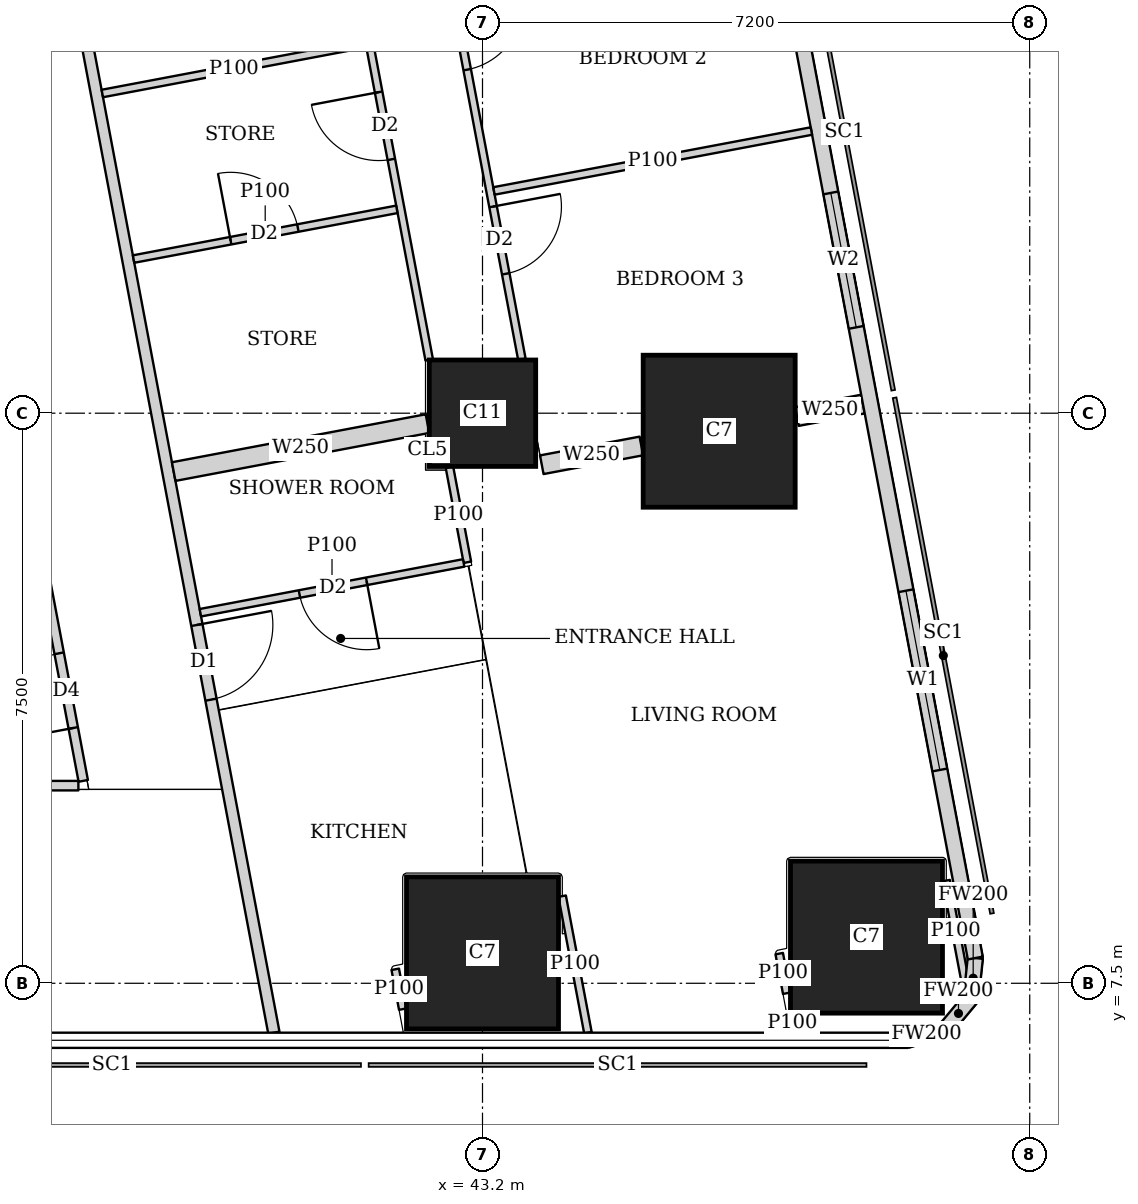
"""IFC4 building model, lengths in metres.
Left out: names, types, materials, properties, quantities, classifications, styles, units other than length and angle.
Written with IfcOpenShell. Run it as: python <this file> out.ifc"""

import sys

from ifc_helpers import new_model, si_unit, direction, frame, frame_2d, origin, origin_2d, place, context, subcontext, project, spatial, rectangle, extrude, element, fill, save


model = new_model("IFC4")
c1 = context("Model", 3, precision=1e-05, world=origin(), true_north=direction((0.0, 1.0)))
c2 = subcontext(c1, "Body", "Model", "MODEL_VIEW")
j1 = project(units=[si_unit("LENGTHUNIT", "METRE"), si_unit("PLANEANGLEUNIT", "RADIAN")], contexts=[c1])
p1 = place(None, origin())
s1 = spatial("IfcSite", under=j1, at=p1, CompositionType="ELEMENT")
p2 = place(p1, origin())
s2 = spatial("IfcBuilding", under=s1, at=p2, CompositionType="ELEMENT")
p3 = place(p2, frame((0.0, 0.0, 281.6)))
s3 = spatial("IfcBuildingStorey", under=s2, at=p3, CompositionType="ELEMENT", Elevation=281.6)
for number, where, z_axis, x_axis in (
    (1, (43.2, 7.9, 0.0), (0.0, 0.0, 1.0), (1.0, 0.0, 0.0)),
    (2, (48.252, 8.107, 0.0), (0.0, 0.0, 1.0), (1.0, 0.0, 0.0)),
):
    element("IfcColumn", number, at=place(p3, frame(where, z_axis=z_axis, x_axis=x_axis)), inside=s3, PredefinedType="COLUMN", context=c2, shape_type="SweptSolid", body=[
        extrude(rectangle(XDim=2.0, YDim=2.0, at=origin_2d()), origin(), (0.0, 0.0, 1.0), 3.75),
    ])
p4 = place(p3, frame((43.2, 15.0, 0.0), z_axis=(0.0, 0.0, 1.0), x_axis=(1.0, 0.0, 0.0)))
e3 = element("IfcColumn", 3, at=p4, inside=s3, PredefinedType="COLUMN", context=c2, shape_type="SweptSolid", body=[
    extrude(rectangle(XDim=1.4, YDim=1.4, at=origin_2d()), origin(), (0.0, 0.0, 1.0), 3.75),
])
p5 = place(p3, frame((46.314, 14.763, 0.0), z_axis=(0.0, 0.0, 1.0), x_axis=(1.0, 0.0, 0.0)))
e4 = element("IfcColumn", 4, at=p5, inside=s3, PredefinedType="COLUMN", context=c2, shape_type="SweptSolid", body=[
    extrude(rectangle(XDim=2.0, YDim=2.0, at=origin_2d()), origin(), (0.0, 0.0, 1.0), 3.75),
])
p6 = place(p3, frame((48.787, 6.75, 0.0), z_axis=(0.0, 0.0, 1.0), x_axis=(0.957282247819, 0.289155145225, 0.0)))
e5 = element("IfcWall", 5, at=p6, inside=s3, PredefinedType="SOLIDWALL", context=c2, shape_type="SweptSolid", body=[
    extrude(rectangle(XDim=0.533, YDim=0.2, at=frame_2d((0.266, 0.0))), origin(), (0.0, 0.0, 1.0), 3.5),
])
p7 = place(p3, frame((49.297, 6.904, 0.0), z_axis=(0.0, 0.0, 1.0), x_axis=(0.639255849474, 0.768994121508, 0.0)))
e6 = element("IfcWall", 6, at=p7, inside=s3, PredefinedType="SOLIDWALL", context=c2, shape_type="SweptSolid", body=[
    extrude(rectangle(XDim=0.518, YDim=0.2, at=frame_2d((0.259, 0.0))), origin(), (0.0, 0.0, 1.0), 3.5),
])
p8 = place(p3, frame((49.628, 7.302, 0.0), z_axis=(0.0, 0.0, 1.0), x_axis=(0.105352390132, 0.994434952068, 0.0)))
e7 = element("IfcWall", 7, at=p8, inside=s3, PredefinedType="SOLIDWALL", context=c2, shape_type="SweptSolid", body=[
    extrude(rectangle(XDim=0.533, YDim=0.2, at=frame_2d((0.267, 0.0))), origin(), (0.0, 0.0, 1.0), 3.5),
])
p9 = place(p3, frame((49.684, 7.832, 0.0), z_axis=(0.0, 0.0, 1.0), x_axis=(-0.185616669694, 0.982622232565, 0.0)))
e8 = element("IfcWall", 8, at=p9, inside=s3, PredefinedType="SOLIDWALL", context=c2, shape_type="SweptSolid", body=[
    extrude(rectangle(XDim=36.0, YDim=0.2, at=frame_2d((18.0, 0.0))), origin(), (0.0, 0.0, 1.0), 3.5),
])
p10 = place(p9, frame((2.518, 0.0, 0.9)))
e9 = element("IfcOpeningElement", 9, at=p10, cuts=e8, PredefinedType="OPENING", context=c2, shape_type="SweptSolid", body=[
    extrude(rectangle(XDim=2.4, YDim=1.5, at=frame_2d((1.2, 0.75))), frame((0.0, 0.11, 0.0), z_axis=(0.0, -1.0, 0.0), x_axis=(1.0, 0.0, 0.0)), (0.0, 0.0, 1.0), 0.22),
])
p11 = place(p9, frame((8.444, 0.0, 0.9)))
e10 = element("IfcOpeningElement", 10, at=p11, cuts=e8, PredefinedType="OPENING", context=c2, shape_type="SweptSolid", body=[
    extrude(rectangle(XDim=1.8, YDim=1.5, at=frame_2d((0.9, 0.75))), frame((0.0, 0.11, 0.0), z_axis=(0.0, -1.0, 0.0), x_axis=(1.0, 0.0, 0.0)), (0.0, 0.0, 1.0), 0.22),
])
p12 = place(p9, frame((12.261, 0.0, 0.9)))
e11 = element("IfcOpeningElement", 11, at=p12, cuts=e8, PredefinedType="OPENING", context=c2, shape_type="SweptSolid", body=[
    extrude(rectangle(XDim=1.8, YDim=1.5, at=frame_2d((0.9, 0.75))), frame((0.0, 0.11, 0.0), z_axis=(0.0, -1.0, 0.0), x_axis=(1.0, 0.0, 0.0)), (0.0, 0.0, 1.0), 0.22),
])
p13 = place(p9, frame((16.078, 0.0, 0.9)))
e12 = element("IfcOpeningElement", 12, at=p13, cuts=e8, PredefinedType="OPENING", context=c2, shape_type="SweptSolid", body=[
    extrude(rectangle(XDim=1.8, YDim=1.5, at=frame_2d((0.9, 0.75))), frame((0.0, 0.11, 0.0), z_axis=(0.0, -1.0, 0.0), x_axis=(1.0, 0.0, 0.0)), (0.0, 0.0, 1.0), 0.22),
])
p14 = place(p9, frame((19.894, 0.0, 0.9)))
e13 = element("IfcOpeningElement", 13, at=p14, cuts=e8, PredefinedType="OPENING", context=c2, shape_type="SweptSolid", body=[
    extrude(rectangle(XDim=1.8, YDim=1.5, at=frame_2d((0.9, 0.75))), frame((0.0, 0.11, 0.0), z_axis=(0.0, -1.0, 0.0), x_axis=(1.0, 0.0, 0.0)), (0.0, 0.0, 1.0), 0.22),
])
p15 = place(p9, frame((23.71, 0.0, 0.9)))
e14 = element("IfcOpeningElement", 14, at=p15, cuts=e8, PredefinedType="OPENING", context=c2, shape_type="SweptSolid", body=[
    extrude(rectangle(XDim=1.8, YDim=1.5, at=frame_2d((0.9, 0.75))), frame((0.0, 0.11, 0.0), z_axis=(0.0, -1.0, 0.0), x_axis=(1.0, 0.0, 0.0)), (0.0, 0.0, 1.0), 0.22),
])
p16 = place(p9, frame((27.526, 0.0, 0.9)))
e15 = element("IfcOpeningElement", 15, at=p16, cuts=e8, PredefinedType="OPENING", context=c2, shape_type="SweptSolid", body=[
    extrude(rectangle(XDim=1.8, YDim=1.5, at=frame_2d((0.9, 0.75))), frame((0.0, 0.11, 0.0), z_axis=(0.0, -1.0, 0.0), x_axis=(1.0, 0.0, 0.0)), (0.0, 0.0, 1.0), 0.22),
])
p17 = place(p9, frame((32.046, 0.0, 0.9)))
e16 = element("IfcOpeningElement", 16, at=p17, cuts=e8, PredefinedType="OPENING", context=c2, shape_type="SweptSolid", body=[
    extrude(rectangle(XDim=1.8, YDim=1.5, at=frame_2d((0.9, 0.75))), frame((0.0, 0.11, 0.0), z_axis=(0.0, -1.0, 0.0), x_axis=(1.0, 0.0, 0.0)), (0.0, 0.0, 1.0), 0.22),
])
p18 = place(p3, frame((33.781, 42.186, 0.0), z_axis=(0.0, 0.0, 1.0), x_axis=(0.185593518645, -0.9826266055, 0.0)))
e17 = element("IfcWall", 17, at=p18, inside=s3, PredefinedType="SOLIDWALL", context=c2, shape_type="SweptSolid", body=[
    extrude(rectangle(XDim=35.961, YDim=0.15, at=frame_2d((17.98, 0.0))), origin(), (0.0, 0.0, 1.0), 2.5),
])
p19 = place(p18, frame((11.76, 0.0, 0.0)))
e18 = element("IfcOpeningElement", 18, at=p19, cuts=e17, PredefinedType="OPENING", context=c2, shape_type="SweptSolid", body=[
    extrude(rectangle(XDim=1.0, YDim=2.1, at=frame_2d((0.5, 1.05))), frame((0.0, 0.085, 0.0), z_axis=(0.0, -1.0, 0.0), x_axis=(1.0, 0.0, 0.0)), (0.0, 0.0, 1.0), 0.17),
])
p20 = place(p18, frame((15.576, 0.0, 0.0)))
e19 = element("IfcOpeningElement", 19, at=p20, cuts=e17, PredefinedType="OPENING", context=c2, shape_type="SweptSolid", body=[
    extrude(rectangle(XDim=1.0, YDim=2.1, at=frame_2d((0.5, 1.05))), frame((0.0, 0.085, 0.0), z_axis=(0.0, -1.0, 0.0), x_axis=(1.0, 0.0, 0.0)), (0.0, 0.0, 1.0), 0.17),
])
p21 = place(p18, frame((30.502, 0.0, 0.0)))
e20 = element("IfcOpeningElement", 20, at=p21, cuts=e17, PredefinedType="OPENING", context=c2, shape_type="SweptSolid", body=[
    extrude(rectangle(XDim=1.0, YDim=2.1, at=frame_2d((0.5, 1.05))), frame((0.0, 0.085, 0.0), z_axis=(0.0, -1.0, 0.0), x_axis=(1.0, 0.0, 0.0)), (0.0, 0.0, 1.0), 0.17),
])
p22 = place(p3, frame((44.248, 8.646, 0.0), z_axis=(0.0, 0.0, 1.0), x_axis=(0.185417594585, -0.982659816833, 0.0)))
e21 = element("IfcWall", 21, at=p22, inside=s3, PredefinedType="PARTITIONING", context=c2, shape_type="SweptSolid", body=[
    extrude(rectangle(XDim=1.828, YDim=0.1, at=frame_2d((0.914, 0.0))), origin(), (0.0, 0.0, 1.0), 2.05),
])
p23 = place(p3, frame((42.151, 7.16, 0.0), z_axis=(0.0, 0.0, 1.0), x_axis=(-0.185366164644, 0.982669519729, 0.0)))
e22 = element("IfcWall", 22, at=p23, inside=s3, PredefinedType="PARTITIONING", context=c2, shape_type="SweptSolid", body=[
    extrude(rectangle(XDim=0.533, YDim=0.1, at=frame_2d((0.267, 0.0))), origin(), (0.0, 0.0, 1.0), 2.5),
])
p24 = place(p3, frame((49.3, 8.851, 0.0), z_axis=(0.0, 0.0, 1.0), x_axis=(0.18581620423, -0.982584519645, 0.0)))
e23 = element("IfcWall", 23, at=p24, inside=s3, PredefinedType="PARTITIONING", context=c2, shape_type="SweptSolid", body=[
    extrude(rectangle(XDim=1.351, YDim=0.1, at=frame_2d((0.675, 0.0))), origin(), (0.0, 0.0, 1.0), 3.5),
])
p25 = place(p3, frame((47.301, 6.85, 0.0), z_axis=(0.0, 0.0, 1.0), x_axis=(-0.187513903188, 0.982261948826, 0.0)))
e24 = element("IfcWall", 24, at=p25, inside=s3, PredefinedType="PARTITIONING", context=c2, shape_type="SweptSolid", body=[
    extrude(rectangle(XDim=0.251, YDim=0.1, at=frame_2d((0.125, 0.0))), origin(), (0.0, 0.0, 1.0), 3.5),
])
p26 = place(p3, frame((47.203, 7.369, 0.0), z_axis=(0.0, 0.0, 1.0), x_axis=(-0.186456243114, 0.982463266185, 0.0)))
e25 = element("IfcWall", 25, at=p26, inside=s3, PredefinedType="PARTITIONING", context=c2, shape_type="SweptSolid", body=[
    extrude(rectangle(XDim=0.53, YDim=0.1, at=frame_2d((0.265, 0.0))), origin(), (0.0, 0.0, 1.0), 2.05),
])
p27 = place(p3, frame((41.894, 25.366, 0.0), z_axis=(0.0, 0.0, 1.0), x_axis=(0.185612905165, -0.982622943675, 0.0)))
e26 = element("IfcWall", 26, at=p27, inside=s3, PredefinedType="PARTITIONING", context=c2, shape_type="SweptSolid", body=[
    extrude(rectangle(XDim=9.827, YDim=0.1, at=frame_2d((4.913, 0.0))), origin(), (0.0, 0.0, 1.0), 2.5),
])
p28 = place(p27, frame((0.151, 0.0, 0.0)))
e27 = element("IfcOpeningElement", 27, at=p28, cuts=e26, PredefinedType="OPENING", context=c2, shape_type="SweptSolid", body=[
    extrude(rectangle(XDim=0.9, YDim=2.1, at=frame_2d((0.45, 1.05))), frame((0.0, 0.06, 0.0), z_axis=(0.0, -1.0, 0.0), x_axis=(1.0, 0.0, 0.0)), (0.0, 0.0, 1.0), 0.12),
])
p29 = place(p27, frame((5.05, 0.0, 0.0)))
e28 = element("IfcOpeningElement", 28, at=p29, cuts=e26, PredefinedType="OPENING", context=c2, shape_type="SweptSolid", body=[
    extrude(rectangle(XDim=0.9, YDim=2.1, at=frame_2d((0.45, 1.05))), frame((0.0, 0.06, 0.0), z_axis=(0.0, -1.0, 0.0), x_axis=(1.0, 0.0, 0.0)), (0.0, 0.0, 1.0), 0.12),
])
p30 = place(p27, frame((7.783, 0.0, 0.0)))
e29 = element("IfcOpeningElement", 29, at=p30, cuts=e26, PredefinedType="OPENING", context=c2, shape_type="SweptSolid", body=[
    extrude(rectangle(XDim=0.9, YDim=2.1, at=frame_2d((0.45, 1.05))), frame((0.0, 0.06, 0.0), z_axis=(0.0, -1.0, 0.0), x_axis=(1.0, 0.0, 0.0)), (0.0, 0.0, 1.0), 0.12),
])
p31 = place(p3, frame((40.706, 25.192, 0.0), z_axis=(0.0, 0.0, 1.0), x_axis=(0.185629824463, -0.982619747547, 0.0)))
e30 = element("IfcWall", 30, at=p31, inside=s3, PredefinedType="PARTITIONING", context=c2, shape_type="SweptSolid", body=[
    extrude(rectangle(XDim=9.659, YDim=0.1, at=frame_2d((4.83, 0.0))), origin(), (0.0, 0.0, 1.0), 2.5),
])
p32 = place(p31, frame((0.575, 0.0, 0.0)))
e31 = element("IfcOpeningElement", 31, at=p32, cuts=e30, PredefinedType="OPENING", context=c2, shape_type="SweptSolid", body=[
    extrude(rectangle(XDim=0.9, YDim=2.1, at=frame_2d((0.45, 1.05))), frame((0.0, 0.06, 0.0), z_axis=(0.0, -1.0, 0.0), x_axis=(1.0, 0.0, 0.0)), (0.0, 0.0, 1.0), 0.12),
])
p33 = place(p31, frame((4.166, 0.0, 0.0)))
e32 = element("IfcOpeningElement", 32, at=p33, cuts=e30, PredefinedType="OPENING", context=c2, shape_type="SweptSolid", body=[
    extrude(rectangle(XDim=0.9, YDim=2.1, at=frame_2d((0.45, 1.05))), frame((0.0, 0.06, 0.0), z_axis=(0.0, -1.0, 0.0), x_axis=(1.0, 0.0, 0.0)), (0.0, 0.0, 1.0), 0.12),
])
p34 = place(p31, frame((2.483, 0.0, 0.0)))
e33 = element("IfcOpeningElement", 33, at=p34, cuts=e30, PredefinedType="OPENING", context=c2, shape_type="SweptSolid", body=[
    extrude(rectangle(XDim=0.9, YDim=2.1, at=frame_2d((0.45, 1.05))), frame((0.0, 0.06, 0.0), z_axis=(0.0, -1.0, 0.0), x_axis=(1.0, 0.0, 0.0)), (0.0, 0.0, 1.0), 0.12),
])
p35 = place(p31, frame((6.074, 0.0, 0.0)))
e34 = element("IfcOpeningElement", 34, at=p35, cuts=e30, PredefinedType="OPENING", context=c2, shape_type="SweptSolid", body=[
    extrude(rectangle(XDim=0.9, YDim=2.1, at=frame_2d((0.45, 1.05))), frame((0.0, 0.06, 0.0), z_axis=(0.0, -1.0, 0.0), x_axis=(1.0, 0.0, 0.0)), (0.0, 0.0, 1.0), 0.12),
])
p36 = place(p3, frame((47.527, 18.712, 0.0), z_axis=(0.0, 0.0, 1.0), x_axis=(-0.982665405803, -0.185387972203, 0.0)))
e35 = element("IfcWall", 35, at=p36, inside=s3, PredefinedType="PARTITIONING", context=c2, shape_type="SweptSolid", body=[
    extrude(rectangle(XDim=4.25, YDim=0.1, at=frame_2d((2.125, 0.0))), origin(), (0.0, 0.0, 1.0), 2.5),
])
p37 = place(p3, frame((42.073, 17.682, 0.0), z_axis=(0.0, 0.0, 1.0), x_axis=(-0.98265117712, -0.185463376723, 0.0)))
e36 = element("IfcWall", 36, at=p37, inside=s3, PredefinedType="PARTITIONING", context=c2, shape_type="SweptSolid", body=[
    extrude(rectangle(XDim=3.525, YDim=0.1, at=frame_2d((1.763, 0.0))), origin(), (0.0, 0.0, 1.0), 3.5),
])
p38 = place(p37, frame((1.325, 0.0, 0.0)))
e37 = element("IfcOpeningElement", 37, at=p38, cuts=e36, PredefinedType="OPENING", context=c2, shape_type="SweptSolid", body=[
    extrude(rectangle(XDim=0.9, YDim=2.1, at=frame_2d((0.45, 1.05))), frame((0.0, 0.06, 0.0), z_axis=(0.0, -1.0, 0.0), x_axis=(1.0, 0.0, 0.0)), (0.0, 0.0, 1.0), 0.12),
])
p39 = place(p3, frame((41.662, 19.861, 0.0), z_axis=(0.0, 0.0, 1.0), x_axis=(-0.982588017646, -0.185797706064, 0.0)))
e38 = element("IfcWall", 38, at=p39, inside=s3, PredefinedType="PARTITIONING", context=c2, shape_type="SweptSolid", body=[
    extrude(rectangle(XDim=3.525, YDim=0.1, at=frame_2d((1.763, 0.0))), origin(), (0.0, 0.0, 1.0), 3.5),
])
p40 = place(p3, frame((42.765, 14.29, 0.0), z_axis=(0.0, 0.0, 1.0), x_axis=(0.185446293138, -0.982654401283, 0.0)))
e39 = element("IfcWall", 39, at=p40, inside=s3, PredefinedType="PARTITIONING", context=c2, shape_type="SweptSolid", body=[
    extrude(rectangle(XDim=1.273, YDim=0.1, at=frame_2d((0.636, 0.0))), origin(), (0.0, 0.0, 1.0), 3.5),
])
p41 = place(p3, frame((42.952, 13.03, 0.0), z_axis=(0.0, 0.0, 1.0), x_axis=(-0.982585626838, -0.185810349366, 0.0)))
e40 = element("IfcWall", 40, at=p41, inside=s3, PredefinedType="PARTITIONING", context=c2, shape_type="SweptSolid", body=[
    extrude(rectangle(XDim=3.525, YDim=0.1, at=frame_2d((1.763, 0.0))), origin(), (0.0, 0.0, 1.0), 3.5),
])
p42 = place(p41, frame((1.299, 0.0, 0.0)))
e41 = element("IfcOpeningElement", 41, at=p42, cuts=e40, PredefinedType="OPENING", context=c2, shape_type="SweptSolid", body=[
    extrude(rectangle(XDim=0.9, YDim=2.1, at=frame_2d((0.45, 1.05))), frame((0.0, 0.06, 0.0), z_axis=(0.0, -1.0, 0.0), x_axis=(1.0, 0.0, 0.0)), (0.0, 0.0, 1.0), 0.12),
])
p43 = place(p3, frame((48.206, 15.12, 0.0), z_axis=(0.0, 0.0, 1.0), x_axis=(-0.982608419258, -0.185689780017, 0.0)))
e42 = element("IfcWall", 42, at=p43, inside=s3, PredefinedType="SOLIDWALL", context=c2, shape_type="SweptSolid", body=[
    extrude(rectangle(XDim=0.884, YDim=0.25, at=frame_2d((0.442, 0.0))), origin(), (0.0, 0.0, 1.0), 3.5),
])
p44 = place(p3, frame((45.29, 14.569, 0.0), z_axis=(0.0, 0.0, 1.0), x_axis=(-0.982676759201, -0.185327782391, 0.0)))
e43 = element("IfcWall", 43, at=p44, inside=s3, PredefinedType="SOLIDWALL", context=c2, shape_type="SweptSolid", body=[
    extrude(rectangle(XDim=1.333, YDim=0.25, at=frame_2d((0.667, 0.0))), origin(), (0.0, 0.0, 1.0), 3.5),
])
p45 = place(p3, frame((42.476, 14.863, 0.0), z_axis=(0.0, 0.0, 1.0), x_axis=(-0.982603567712, -0.185715450942, 0.0)))
e44 = element("IfcWall", 44, at=p45, inside=s3, PredefinedType="SOLIDWALL", context=c2, shape_type="SweptSolid", body=[
    extrude(rectangle(XDim=3.398, YDim=0.25, at=frame_2d((1.699, 0.0))), origin(), (0.0, 0.0, 1.0), 3.5),
])
p46 = place(p3, frame((28.95, 10.1, 0.0), z_axis=(0.0, 0.0, 1.0), x_axis=(1.0, 0.0, 0.0)))
e45 = element("IfcWall", 45, at=p46, inside=s3, PredefinedType="PARTITIONING", context=c2, shape_type="SweptSolid", body=[
    extrude(rectangle(XDim=8.933, YDim=0.125, at=frame_2d((4.467, 0.0))), origin(), (0.0, 0.0, 1.0), 3.5),
])
p47 = place(p3, frame((37.947, 10.163, 0.0), z_axis=(0.0, 0.0, 1.0), x_axis=(-0.185572770922, 0.982630523998, 0.0)))
e46 = element("IfcWall", 46, at=p47, inside=s3, PredefinedType="PARTITIONING", context=c2, shape_type="SweptSolid", body=[
    extrude(rectangle(XDim=25.111, YDim=0.125, at=frame_2d((12.556, 0.0))), origin(), (0.0, 0.0, 1.0), 2.5),
])
p48 = place(p47, frame((0.708, 0.0, 0.0)))
e47 = element("IfcOpeningElement", 47, at=p48, cuts=e46, PredefinedType="OPENING", context=c2, shape_type="SweptSolid", body=[
    extrude(rectangle(XDim=1.0, YDim=2.1, at=frame_2d((0.5, 1.05))), frame((0.0, 0.073, 0.0), z_axis=(0.0, -1.0, 0.0), x_axis=(1.0, 0.0, 0.0)), (0.0, 0.0, 1.0), 0.145),
])
p49 = place(p47, frame((5.9, 0.0, 0.0)))
e48 = element("IfcOpeningElement", 48, at=p49, cuts=e46, PredefinedType="OPENING", context=c2, shape_type="SweptSolid", body=[
    extrude(rectangle(XDim=1.0, YDim=2.1, at=frame_2d((0.5, 1.05))), frame((0.0, 0.073, 0.0), z_axis=(0.0, -1.0, 0.0), x_axis=(1.0, 0.0, 0.0)), (0.0, 0.0, 1.0), 0.145),
])
p50 = place(p47, frame((13.378, 0.0, 0.0)))
e49 = element("IfcOpeningElement", 49, at=p50, cuts=e46, PredefinedType="OPENING", context=c2, shape_type="SweptSolid", body=[
    extrude(rectangle(XDim=1.0, YDim=2.1, at=frame_2d((0.5, 1.05))), frame((0.0, 0.073, 0.0), z_axis=(0.0, -1.0, 0.0), x_axis=(1.0, 0.0, 0.0)), (0.0, 0.0, 1.0), 0.145),
])
p51 = place(p47, frame((21.15, 0.0, 0.0)))
e50 = element("IfcOpeningElement", 50, at=p51, cuts=e46, PredefinedType="OPENING", context=c2, shape_type="SweptSolid", body=[
    extrude(rectangle(XDim=1.0, YDim=2.1, at=frame_2d((0.5, 1.05))), frame((0.0, 0.073, 0.0), z_axis=(0.0, -1.0, 0.0), x_axis=(1.0, 0.0, 0.0)), (0.0, 0.0, 1.0), 0.145),
])
p52 = place(p10, origin())
e51 = element("IfcWindow", 51, at=p52, inside=s3, PartitioningType="SINGLE_PANEL", PredefinedType="WINDOW", context=c2, shape_type="SweptSolid", body=[
    extrude(rectangle(XDim=2.4, YDim=1.5, at=frame_2d((1.2, 0.75))), frame((0.0, 0.03, 0.0), z_axis=(0.0, -1.0, 0.0), x_axis=(1.0, 0.0, 0.0)), (0.0, 0.0, 1.0), 0.06),
])
fill(e9, e51)
p53 = place(p11, origin())
e52 = element("IfcWindow", 52, at=p53, inside=s3, PartitioningType="SINGLE_PANEL", PredefinedType="WINDOW", context=c2, shape_type="SweptSolid", body=[
    extrude(rectangle(XDim=1.8, YDim=1.5, at=frame_2d((0.9, 0.75))), frame((0.0, 0.03, 0.0), z_axis=(0.0, -1.0, 0.0), x_axis=(1.0, 0.0, 0.0)), (0.0, 0.0, 1.0), 0.06),
])
fill(e10, e52)
p54 = place(p29, origin())
e53 = element("IfcDoor", 53, at=p54, inside=s3, OperationType="SINGLE_SWING_LEFT", PredefinedType="DOOR", context=c2, shape_type="SweptSolid", body=[
    extrude(rectangle(XDim=0.9, YDim=2.1, at=frame_2d((0.45, 1.05))), frame((0.0, 0.025, 0.0), z_axis=(0.0, -1.0, 0.0), x_axis=(1.0, 0.0, 0.0)), (0.0, 0.0, 1.0), 0.05),
])
fill(e28, e53)
p55 = place(p30, origin())
e54 = element("IfcDoor", 54, at=p55, inside=s3, OperationType="SINGLE_SWING_LEFT", PredefinedType="DOOR", context=c2, shape_type="SweptSolid", body=[
    extrude(rectangle(XDim=0.9, YDim=2.1, at=frame_2d((0.45, 1.05))), frame((0.0, 0.025, 0.0), z_axis=(0.0, -1.0, 0.0), x_axis=(1.0, 0.0, 0.0)), (0.0, 0.0, 1.0), 0.05),
])
fill(e29, e54)
p56 = place(p35, origin())
e55 = element("IfcDoor", 55, at=p56, inside=s3, OperationType="SINGLE_SWING_RIGHT", PredefinedType="DOOR", context=c2, shape_type="SweptSolid", body=[
    extrude(rectangle(XDim=0.9, YDim=2.1, at=frame_2d((0.45, 1.05))), frame((0.0, 0.025, 0.0), z_axis=(0.0, -1.0, 0.0), x_axis=(1.0, 0.0, 0.0)), (0.0, 0.0, 1.0), 0.05),
])
fill(e34, e55)
p57 = place(p42, origin())
e56 = element("IfcDoor", 56, at=p57, inside=s3, OperationType="SINGLE_SWING_LEFT", PredefinedType="DOOR", context=c2, shape_type="SweptSolid", body=[
    extrude(rectangle(XDim=0.9, YDim=2.1, at=frame_2d((0.45, 1.05))), frame((0.0, 0.025, 0.0), z_axis=(0.0, -1.0, 0.0), x_axis=(1.0, 0.0, 0.0)), (0.0, 0.0, 1.0), 0.05),
])
fill(e41, e56)
p58 = place(p21, origin())
e57 = element("IfcDoor", 57, at=p58, inside=s3, OperationType="SINGLE_SWING_LEFT", PredefinedType="DOOR", context=c2, shape_type="SweptSolid", body=[
    extrude(rectangle(XDim=1.0, YDim=2.1, at=frame_2d((0.5, 1.05))), frame((0.0, 0.025, 0.0), z_axis=(0.0, -1.0, 0.0), x_axis=(1.0, 0.0, 0.0)), (0.0, 0.0, 1.0), 0.05),
])
fill(e20, e57)
p59 = place(p38, origin())
e58 = element("IfcDoor", 58, at=p59, inside=s3, OperationType="SINGLE_SWING_LEFT", PredefinedType="DOOR", context=c2, shape_type="SweptSolid", body=[
    extrude(rectangle(XDim=0.9, YDim=2.1, at=frame_2d((0.45, 1.05))), frame((0.0, 0.025, 0.0), z_axis=(0.0, -1.0, 0.0), x_axis=(1.0, 0.0, 0.0)), (0.0, 0.0, 1.0), 0.05),
])
fill(e37, e58)
p60 = place(p48, origin())
e59 = element("IfcDoor", 59, at=p60, inside=s3, OperationType="SINGLE_SWING_LEFT", PredefinedType="DOOR", context=c2, shape_type="SweptSolid", body=[
    extrude(rectangle(XDim=1.0, YDim=2.1, at=frame_2d((0.5, 1.05))), frame((0.0, 0.025, 0.0), z_axis=(0.0, -1.0, 0.0), x_axis=(1.0, 0.0, 0.0)), (0.0, 0.0, 1.0), 0.05),
])
fill(e47, e59)
save(model, sys.argv[1])
